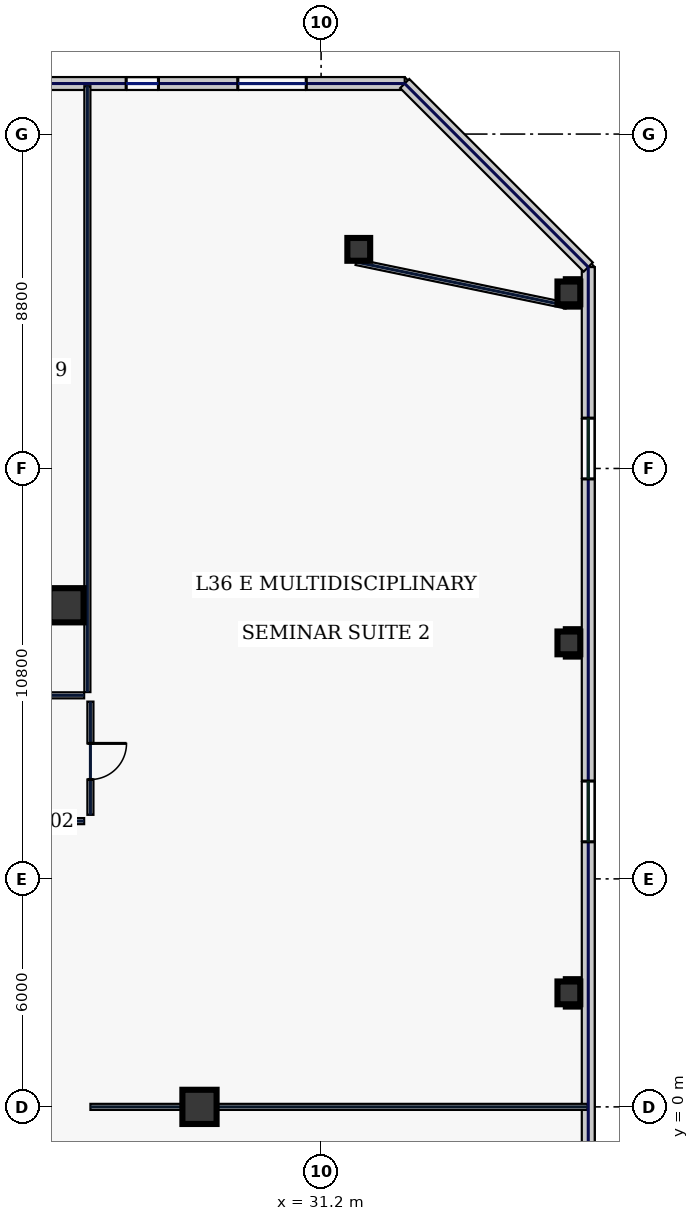
"""IFC4 building model, lengths in metres.
Left out: names, types, materials, properties, quantities, classifications, styles, units other than length and angle.
Written with IfcOpenShell. Run it as: python <this file> out.ifc"""

import sys

from ifc_helpers import new_model, si_unit, direction, frame, frame_2d, origin, origin_2d, place, context, subcontext, project, spatial, rectangle, hollow_rectangle, extrude, element, fill, save


model = new_model("IFC4")
c1 = context("Model", 3, precision=1e-05, world=origin(), true_north=direction((0.0, 1.0)))
c2 = subcontext(c1, "Body", "Model", "MODEL_VIEW")
j1 = project(units=[si_unit("LENGTHUNIT", "METRE"), si_unit("PLANEANGLEUNIT", "RADIAN")], contexts=[c1])
p1 = place(None, origin())
s1 = spatial("IfcSite", under=j1, at=p1, CompositionType="ELEMENT")
p2 = place(p1, origin())
s2 = spatial("IfcBuilding", under=s1, at=p2, CompositionType="ELEMENT")
p3 = place(p2, frame((0.0, 0.0, 160.2)))
s3 = spatial("IfcBuildingStorey", under=s2, at=p3, CompositionType="ELEMENT", Elevation=160.2)
for number, where, z_axis, x_axis in (
    (1, (24.5, 13.2, 0.0), (0.0, 0.0, 1.0), (1.0, 0.0, 0.0)),
    (2, (28.0, 0.0, 0.0), (0.0, 0.0, 1.0), (1.0, 0.0, 0.0)),
):
    element("IfcColumn", number, at=place(p3, frame(where, z_axis=z_axis, x_axis=x_axis)), inside=s3, PredefinedType="COLUMN", context=c2, shape_type="SweptSolid", body=[
        extrude(hollow_rectangle(XDim=0.9, YDim=0.9, WallThickness=0.04, at=origin_2d()), origin(), (0.0, 0.0, 1.0), 3.74),
    ])
for number, where, z_axis, x_axis in (
    (3, (32.191, 22.566, 0.0), (0.0, 0.0, 1.0), (1.0, 0.0, 0.0)),
    (4, (37.72, 3.0, 0.0), (0.0, 0.0, 1.0), (1.0, 0.0, 0.0)),
    (5, (37.72, 12.21, 0.0), (0.0, 0.0, 1.0), (1.0, 0.0, 0.0)),
    (6, (37.72, 21.42, 0.0), (0.0, 0.0, 1.0), (1.0, 0.0, 0.0)),
):
    element("IfcColumn", number, at=place(p3, frame(where, z_axis=z_axis, x_axis=x_axis)), inside=s3, PredefinedType="COLUMN", context=c2, shape_type="SweptSolid", body=[
        extrude(hollow_rectangle(XDim=0.6, YDim=0.6, WallThickness=0.028, at=origin_2d()), origin(), (0.0, 0.0, 1.0), 3.74),
    ])
p4 = place(p3, frame((33.4, 26.93, 0.0), z_axis=(0.0, 0.0, 1.0), x_axis=(-1.0, 0.0, 0.0)))
e7 = element("IfcWall", 7, at=p4, inside=s3, PredefinedType="STANDARD", context=c2, shape_type="SweptSolid", body=[
    extrude(rectangle(XDim=20.09, YDim=0.34, at=frame_2d((10.045, 0.0))), origin(), (0.0, 0.0, 1.0), 3.74),
])
p5 = place(p4, frame((15.005, 0.0, 0.7)))
e8 = element("IfcOpeningElement", 8, at=p5, cuts=e7, PredefinedType="OPENING", context=c2, shape_type="SweptSolid", body=[
    extrude(rectangle(XDim=0.85, YDim=1.85, at=frame_2d((0.425, 0.925))), frame((0.0, 0.18, 0.0), z_axis=(0.0, -1.0, 0.0), x_axis=(1.0, 0.0, 0.0)), (0.0, 0.0, 1.0), 0.36),
])
p6 = place(p4, frame((11.071, 0.0, 0.7)))
e9 = element("IfcOpeningElement", 9, at=p6, cuts=e7, PredefinedType="OPENING", context=c2, shape_type="SweptSolid", body=[
    extrude(rectangle(XDim=0.85, YDim=1.85, at=frame_2d((0.425, 0.925))), frame((0.0, 0.18, 0.0), z_axis=(0.0, -1.0, 0.0), x_axis=(1.0, 0.0, 0.0)), (0.0, 0.0, 1.0), 0.36),
])
p7 = place(p4, frame((6.48, 0.0, 0.7)))
e10 = element("IfcOpeningElement", 10, at=p7, cuts=e7, PredefinedType="OPENING", context=c2, shape_type="SweptSolid", body=[
    extrude(rectangle(XDim=0.85, YDim=1.85, at=frame_2d((0.425, 0.925))), frame((0.0, 0.18, 0.0), z_axis=(0.0, -1.0, 0.0), x_axis=(1.0, 0.0, 0.0)), (0.0, 0.0, 1.0), 0.36),
])
p8 = place(p4, frame((2.591, 0.0, 0.7)))
e11 = element("IfcOpeningElement", 11, at=p8, cuts=e7, PredefinedType="OPENING", context=c2, shape_type="SweptSolid", body=[
    extrude(rectangle(XDim=1.8, YDim=2.2, at=frame_2d((0.9, 1.1))), frame((0.0, 0.18, 0.0), z_axis=(0.0, -1.0, 0.0), x_axis=(1.0, 0.0, 0.0)), (0.0, 0.0, 1.0), 0.36),
])
p9 = place(p3, frame((38.23, -16.1, 0.0), z_axis=(0.0, 0.0, 1.0), x_axis=(0.0, 1.0, 0.0)))
e12 = element("IfcWall", 12, at=p9, inside=s3, PredefinedType="STANDARD", context=c2, shape_type="SweptSolid", body=[
    extrude(rectangle(XDim=38.2, YDim=0.34, at=frame_2d((19.1, 0.0))), origin(), (0.0, 0.0, 1.0), 3.74),
])
p10 = place(p9, frame((3.975, 0.0, 0.58)))
e13 = element("IfcOpeningElement", 13, at=p10, cuts=e12, PredefinedType="OPENING", context=c2, shape_type="SweptSolid", body=[
    extrude(rectangle(XDim=1.6, YDim=2.3, at=frame_2d((0.8, 1.15))), frame((0.0, 0.18, 0.0), z_axis=(0.0, -1.0, 0.0), x_axis=(1.0, 0.0, 0.0)), (0.0, 0.0, 1.0), 0.36),
])
p11 = place(p9, frame((13.525, 0.0, 0.58)))
e14 = element("IfcOpeningElement", 14, at=p11, cuts=e12, PredefinedType="OPENING", context=c2, shape_type="SweptSolid", body=[
    extrude(rectangle(XDim=1.6, YDim=2.3, at=frame_2d((0.8, 1.15))), frame((0.0, 0.18, 0.0), z_axis=(0.0, -1.0, 0.0), x_axis=(1.0, 0.0, 0.0)), (0.0, 0.0, 1.0), 0.36),
])
p12 = place(p9, frame((23.075, 0.0, 0.58)))
e15 = element("IfcOpeningElement", 15, at=p12, cuts=e12, PredefinedType="OPENING", context=c2, shape_type="SweptSolid", body=[
    extrude(rectangle(XDim=1.6, YDim=2.3, at=frame_2d((0.8, 1.15))), frame((0.0, 0.18, 0.0), z_axis=(0.0, -1.0, 0.0), x_axis=(1.0, 0.0, 0.0)), (0.0, 0.0, 1.0), 0.36),
])
p13 = place(p9, frame((32.625, 0.0, 0.58)))
e16 = element("IfcOpeningElement", 16, at=p13, cuts=e12, PredefinedType="OPENING", context=c2, shape_type="SweptSolid", body=[
    extrude(rectangle(XDim=1.6, YDim=2.3, at=frame_2d((0.8, 1.15))), frame((0.0, 0.18, 0.0), z_axis=(0.0, -1.0, 0.0), x_axis=(1.0, 0.0, 0.0)), (0.0, 0.0, 1.0), 0.36),
])
p14 = place(p3, frame((38.23, 22.1, 0.0), z_axis=(0.0, 0.0, 1.0), x_axis=(-0.707124652085, 0.707088909836, 0.0)))
e17 = element("IfcWall", 17, at=p14, inside=s3, PredefinedType="STANDARD", context=c2, shape_type="SweptSolid", body=[
    extrude(rectangle(XDim=6.831, YDim=0.34, at=frame_2d((3.415, 0.0))), origin(), (0.0, 0.0, 1.0), 3.74),
])
p15 = place(p3, frame((37.651, 21.087, 0.0), z_axis=(0.0, 0.0, 1.0), x_axis=(-0.979184618318, 0.202971631636, 0.0)))
e18 = element("IfcWall", 18, at=p15, inside=s3, PredefinedType="PARTITIONING", context=c2, shape_type="SweptSolid", body=[
    extrude(rectangle(XDim=5.646, YDim=0.16, at=frame_2d((2.823, 0.0))), origin(), (0.0, 0.0, 1.0), 3.74),
])
p16 = place(p3, frame((-24.965, 10.83, 0.0), z_axis=(0.0, 0.0, 1.0), x_axis=(1.0, 0.0, 0.0)))
e19 = element("IfcWall", 19, at=p16, inside=s3, PredefinedType="PARTITIONING", context=c2, shape_type="SweptSolid", body=[
    extrude(rectangle(XDim=49.93, YDim=0.16, at=frame_2d((24.965, 0.0))), origin(), (0.0, 0.0, 1.0), 3.74),
])
p17 = place(p16, frame((1.869, 0.0, 0.0)))
e20 = element("IfcOpeningElement", 20, at=p17, cuts=e19, PredefinedType="OPENING", context=c2, shape_type="SweptSolid", body=[
    extrude(rectangle(XDim=1.3, YDim=2.2, at=frame_2d((0.65, 1.1))), frame((0.0, 0.09, 0.0), z_axis=(0.0, -1.0, 0.0), x_axis=(1.0, 0.0, 0.0)), (0.0, 0.0, 1.0), 0.18),
])
p18 = place(p16, frame((8.305, 0.0, 0.0)))
e21 = element("IfcOpeningElement", 21, at=p18, cuts=e19, PredefinedType="OPENING", context=c2, shape_type="SweptSolid", body=[
    extrude(rectangle(XDim=0.95, YDim=2.2, at=frame_2d((0.475, 1.1))), frame((0.0, 0.09, 0.0), z_axis=(0.0, -1.0, 0.0), x_axis=(1.0, 0.0, 0.0)), (0.0, 0.0, 1.0), 0.18),
])
p19 = place(p16, frame((15.705, 0.0, 0.0)))
e22 = element("IfcOpeningElement", 22, at=p19, cuts=e19, PredefinedType="OPENING", context=c2, shape_type="SweptSolid", body=[
    extrude(rectangle(XDim=1.15, YDim=2.2, at=frame_2d((0.575, 1.1))), frame((0.0, 0.09, 0.0), z_axis=(0.0, -1.0, 0.0), x_axis=(1.0, 0.0, 0.0)), (0.0, 0.0, 1.0), 0.18),
])
p20 = place(p16, frame((23.1, 0.0, 0.0)))
e23 = element("IfcOpeningElement", 23, at=p20, cuts=e19, PredefinedType="OPENING", context=c2, shape_type="SweptSolid", body=[
    extrude(rectangle(XDim=1.05, YDim=2.2, at=frame_2d((0.525, 1.1))), frame((0.0, 0.09, 0.0), z_axis=(0.0, -1.0, 0.0), x_axis=(1.0, 0.0, 0.0)), (0.0, 0.0, 1.0), 0.18),
])
p21 = place(p16, frame((30.9, 0.0, 0.0)))
e24 = element("IfcOpeningElement", 24, at=p21, cuts=e19, PredefinedType="OPENING", context=c2, shape_type="SweptSolid", body=[
    extrude(rectangle(XDim=0.95, YDim=2.2, at=frame_2d((0.475, 1.1))), frame((0.0, 0.09, 0.0), z_axis=(0.0, -1.0, 0.0), x_axis=(1.0, 0.0, 0.0)), (0.0, 0.0, 1.0), 0.18),
])
p22 = place(p16, frame((37.495, 0.0, 0.0)))
e25 = element("IfcOpeningElement", 25, at=p22, cuts=e19, PredefinedType="OPENING", context=c2, shape_type="SweptSolid", body=[
    extrude(rectangle(XDim=1.3, YDim=2.2, at=frame_2d((0.65, 1.1))), frame((0.0, 0.09, 0.0), z_axis=(0.0, -1.0, 0.0), x_axis=(1.0, 0.0, 0.0)), (0.0, 0.0, 1.0), 0.18),
])
p23 = place(p16, frame((42.695, 0.0, 0.0)))
e26 = element("IfcOpeningElement", 26, at=p23, cuts=e19, PredefinedType="OPENING", context=c2, shape_type="SweptSolid", body=[
    extrude(rectangle(XDim=1.3, YDim=2.2, at=frame_2d((0.65, 1.1))), frame((0.0, 0.09, 0.0), z_axis=(0.0, -1.0, 0.0), x_axis=(1.0, 0.0, 0.0)), (0.0, 0.0, 1.0), 0.18),
])
p24 = place(p16, frame((46.931, 0.0, 0.0)))
e27 = element("IfcOpeningElement", 27, at=p24, cuts=e19, PredefinedType="OPENING", context=c2, shape_type="SweptSolid", body=[
    extrude(rectangle(XDim=1.45, YDim=2.2, at=frame_2d((0.725, 1.1))), frame((0.0, 0.09, 0.0), z_axis=(0.0, -1.0, 0.0), x_axis=(1.0, 0.0, 0.0)), (0.0, 0.0, 1.0), 0.18),
])
p25 = place(p3, frame((25.13, 10.665, 0.0), z_axis=(0.0, 0.0, 1.0), x_axis=(0.0, -1.0, 0.0)))
e28 = element("IfcWall", 28, at=p25, inside=s3, PredefinedType="PARTITIONING", context=c2, shape_type="SweptSolid", body=[
    extrude(rectangle(XDim=2.98, YDim=0.16, at=frame_2d((1.49, 0.0))), origin(), (0.0, 0.0, 1.0), 3.74),
])
p26 = place(p25, frame((1.1, 0.0, 0.0)))
e29 = element("IfcOpeningElement", 29, at=p26, cuts=e28, PredefinedType="OPENING", context=c2, shape_type="SweptSolid", body=[
    extrude(rectangle(XDim=0.95, YDim=2.2, at=frame_2d((0.475, 1.1))), frame((0.0, 0.09, 0.0), z_axis=(0.0, -1.0, 0.0), x_axis=(1.0, 0.0, 0.0)), (0.0, 0.0, 1.0), 0.18),
])
p27 = place(p3, frame((24.965, 7.52, 0.0), z_axis=(0.0, 0.0, 1.0), x_axis=(-1.0, 0.0, 0.0)))
e30 = element("IfcWall", 30, at=p27, inside=s3, PredefinedType="PARTITIONING", context=c2, shape_type="SweptSolid", body=[
    extrude(rectangle(XDim=14.25, YDim=0.16, at=frame_2d((7.125, 0.0))), origin(), (0.0, 0.0, 1.0), 3.74),
])
p28 = place(p3, frame((25.05, 10.915, 0.0), z_axis=(0.0, 0.0, 1.0), x_axis=(0.0, 1.0, 0.0)))
e31 = element("IfcWall", 31, at=p28, inside=s3, PredefinedType="PARTITIONING", context=c2, shape_type="SweptSolid", body=[
    extrude(rectangle(XDim=15.945, YDim=0.16, at=frame_2d((7.973, 0.0))), origin(), (0.0, 0.0, 1.0), 3.74),
])
p29 = place(p3, frame((25.13, 0.0, 0.0), z_axis=(0.0, 0.0, 1.0), x_axis=(1.0, 0.0, 0.0)))
e32 = element("IfcWall", 32, at=p29, inside=s3, PredefinedType="PARTITIONING", context=c2, shape_type="SweptSolid", body=[
    extrude(rectangle(XDim=13.08, YDim=0.16, at=frame_2d((6.54, 0.0))), origin(), (0.0, 0.0, 1.0), 3.285),
])
p30 = place(p7, origin())
e33 = element("IfcWindow", 33, at=p30, inside=s3, PartitioningType="SINGLE_PANEL", PredefinedType="WINDOW", context=c2, shape_type="SweptSolid", body=[
    extrude(rectangle(XDim=0.85, YDim=1.85, at=frame_2d((0.425, 0.925))), frame((0.0, 0.03, 0.0), z_axis=(0.0, -1.0, 0.0), x_axis=(1.0, 0.0, 0.0)), (0.0, 0.0, 1.0), 0.06),
])
fill(e10, e33)
p31 = place(p8, origin())
e34 = element("IfcWindow", 34, at=p31, inside=s3, PartitioningType="SINGLE_PANEL", PredefinedType="WINDOW", context=c2, shape_type="SweptSolid", body=[
    extrude(rectangle(XDim=1.8, YDim=2.2, at=frame_2d((0.9, 1.1))), frame((0.0, 0.03, 0.0), z_axis=(0.0, -1.0, 0.0), x_axis=(1.0, 0.0, 0.0)), (0.0, 0.0, 1.0), 0.06),
])
fill(e11, e34)
p32 = place(p12, origin())
e35 = element("IfcWindow", 35, at=p32, inside=s3, PartitioningType="SINGLE_PANEL", PredefinedType="WINDOW", context=c2, shape_type="SweptSolid", body=[
    extrude(rectangle(XDim=1.6, YDim=2.3, at=frame_2d((0.8, 1.15))), frame((0.0, 0.03, 0.0), z_axis=(0.0, -1.0, 0.0), x_axis=(1.0, 0.0, 0.0)), (0.0, 0.0, 1.0), 0.06),
])
fill(e15, e35)
p33 = place(p13, origin())
e36 = element("IfcWindow", 36, at=p33, inside=s3, PartitioningType="SINGLE_PANEL", PredefinedType="WINDOW", context=c2, shape_type="SweptSolid", body=[
    extrude(rectangle(XDim=1.6, YDim=2.3, at=frame_2d((0.8, 1.15))), frame((0.0, 0.03, 0.0), z_axis=(0.0, -1.0, 0.0), x_axis=(1.0, 0.0, 0.0)), (0.0, 0.0, 1.0), 0.06),
])
fill(e16, e36)
p34 = place(p26, origin())
e37 = element("IfcDoor", 37, at=p34, inside=s3, OperationType="SINGLE_SWING_LEFT", PredefinedType="DOOR", context=c2, shape_type="SweptSolid", body=[
    extrude(rectangle(XDim=0.95, YDim=2.2, at=frame_2d((0.475, 1.1))), frame((0.0, 0.025, 0.0), z_axis=(0.0, -1.0, 0.0), x_axis=(1.0, 0.0, 0.0)), (0.0, 0.0, 1.0), 0.05),
])
fill(e29, e37)
save(model, sys.argv[1])
